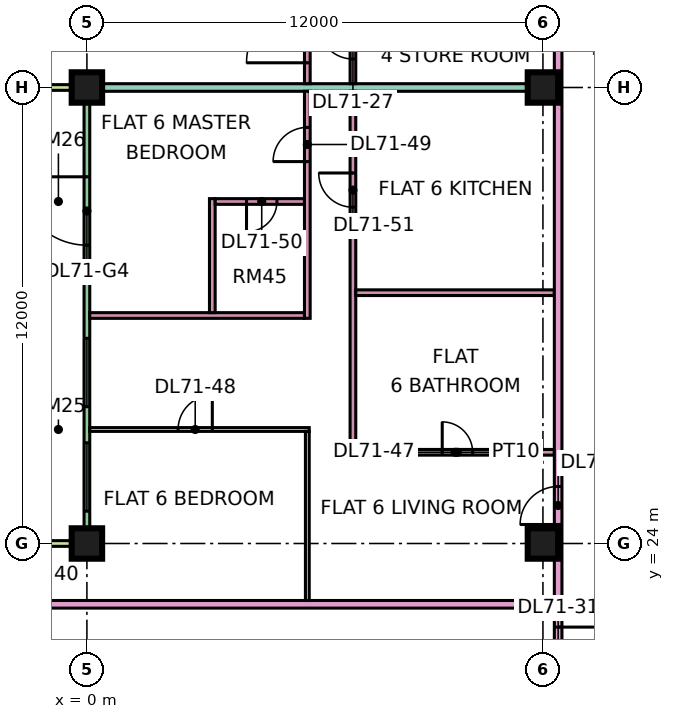
"""IFC4 building model, lengths in metres.
Left out: names, types, materials, properties, quantities, classifications, styles, units other than length and angle.
Written with IfcOpenShell. Run it as: python <this file> out.ifc"""

import sys

from ifc_helpers import new_model, si_unit, direction, frame, frame_2d, origin, origin_2d, place, context, subcontext, project, spatial, rectangle, extrude, element, fill, save


model = new_model("IFC4")
c1 = context("Model", 3, precision=1e-05, world=origin(), true_north=direction((0.0, 1.0)))
c2 = subcontext(c1, "Body", "Model", "MODEL_VIEW")
j1 = project(units=[si_unit("LENGTHUNIT", "METRE"), si_unit("PLANEANGLEUNIT", "RADIAN")], contexts=[c1])
p1 = place(None, origin())
s1 = spatial("IfcSite", under=j1, at=p1, CompositionType="ELEMENT")
p2 = place(p1, origin())
s2 = spatial("IfcBuilding", under=s1, at=p2, CompositionType="ELEMENT")
p3 = place(p2, frame((0.0, 0.0, 303.4)))
s3 = spatial("IfcBuildingStorey", under=s2, at=p3, CompositionType="ELEMENT", Elevation=303.4)
p4 = place(p3, frame((0.0, 24.0, 0.0), z_axis=(0.0, 0.0, 1.0), x_axis=(1.0, 0.0, 0.0)))
e1 = element("IfcColumn", 1, at=p4, inside=s3, PredefinedType="COLUMN", context=c2, shape_type="SweptSolid", body=[
    extrude(rectangle(XDim=0.8, YDim=0.8, at=origin_2d()), origin(), (0.0, 0.0, 1.0), 3.75),
])
p5 = place(p3, frame((0.0, 36.0, 0.0), z_axis=(0.0, 0.0, 1.0), x_axis=(1.0, 0.0, 0.0)))
e2 = element("IfcColumn", 2, at=p5, inside=s3, PredefinedType="COLUMN", context=c2, shape_type="SweptSolid", body=[
    extrude(rectangle(XDim=0.8, YDim=0.8, at=origin_2d()), origin(), (0.0, 0.0, 1.0), 3.75),
])
for number, where, z_axis, x_axis in (
    (3, (12.0, 24.0, 0.0), (0.0, 0.0, 1.0), (1.0, 0.0, 0.0)),
    (4, (12.0, 36.0, 0.0), (0.0, 0.0, 1.0), (1.0, 0.0, 0.0)),
):
    element("IfcColumn", number, at=place(p3, frame(where, z_axis=z_axis, x_axis=x_axis)), inside=s3, PredefinedType="COLUMN", context=c2, shape_type="SweptSolid", body=[
        extrude(rectangle(XDim=0.8, YDim=0.8, at=origin_2d()), origin(), (0.0, 0.0, 1.0), 3.75),
    ])
p6 = place(p3, frame((0.0, 35.925, 0.0), z_axis=(0.0, 0.0, 1.0), x_axis=(0.0, -1.0, 0.0)))
e5 = element("IfcWall", 5, at=p6, inside=s3, PredefinedType="SOLIDWALL", context=c2, shape_type="SweptSolid", body=[
    extrude(rectangle(XDim=11.85, YDim=0.15, at=frame_2d((5.925, 0.0))), origin(), (0.0, 0.0, 1.0), 3.35),
])
p7 = place(p6, frame((2.275, 0.0, 0.0)))
e6 = element("IfcOpeningElement", 6, at=p7, cuts=e5, PredefinedType="OPENING", context=c2, shape_type="SweptSolid", body=[
    extrude(rectangle(XDim=1.8, YDim=2.4, at=frame_2d((0.9, 1.2))), frame((0.0, 0.085, 0.0), z_axis=(0.0, -1.0, 0.0), x_axis=(1.0, 0.0, 0.0)), (0.0, 0.0, 1.0), 0.17),
])
p8 = place(p6, frame((6.525, 0.0, 0.45)))
e7 = element("IfcOpeningElement", 7, at=p8, cuts=e5, PredefinedType="OPENING", context=c2, shape_type="SweptSolid", body=[
    extrude(rectangle(XDim=1.8, YDim=2.4, at=frame_2d((0.9, 1.2))), frame((0.0, 0.085, 0.0), z_axis=(0.0, -1.0, 0.0), x_axis=(1.0, 0.0, 0.0)), (0.0, 0.0, 1.0), 0.17),
])
p9 = place(p6, frame((9.275, 0.0, 0.45)))
e8 = element("IfcOpeningElement", 8, at=p9, cuts=e5, PredefinedType="OPENING", context=c2, shape_type="SweptSolid", body=[
    extrude(rectangle(XDim=1.8, YDim=2.4, at=frame_2d((0.9, 1.2))), frame((0.0, 0.085, 0.0), z_axis=(0.0, -1.0, 0.0), x_axis=(1.0, 0.0, 0.0)), (0.0, 0.0, 1.0), 0.17),
])
for number, where, z_axis, x_axis in (
    (9, (-1.5, 36.0, 0.0), (0.0, 0.0, 1.0), (1.0, 0.0, 0.0)),
    (10, (-1.5, 24.0, 0.0), (0.0, 0.0, 1.0), (1.0, 0.0, 0.0)),
):
    element("IfcWall", number, at=place(p3, frame(where, z_axis=z_axis, x_axis=x_axis)), inside=s3, PredefinedType="SOLIDWALL", context=c2, shape_type="SweptSolid", body=[
        extrude(rectangle(XDim=1.5, YDim=0.15, at=frame_2d((0.75, 0.0))), origin(), (0.0, 0.0, 1.0), 3.35),
    ])
p10 = place(p3, frame((-1.35, 22.4, 0.0), z_axis=(0.0, 0.0, 1.0), x_axis=(1.0, 0.0, 0.0)))
e11 = element("IfcWall", 11, at=p10, inside=s3, PredefinedType="PARTITIONING", context=c2, shape_type="SweptSolid", body=[
    extrude(rectangle(XDim=13.65, YDim=0.2, at=frame_2d((6.825, 0.0))), origin(), (0.0, 0.0, 1.0), 3.35),
])
e12 = element("IfcWall", 12, at=p5, inside=s3, PredefinedType="PARTITIONING", context=c2, shape_type="SweptSolid", body=[
    extrude(rectangle(XDim=12.3, YDim=0.2, at=frame_2d((6.15, 0.0))), origin(), (0.0, 0.0, 1.0), 3.35),
])
p11 = place(p3, frame((0.074, 27.0, 0.0), z_axis=(0.0, 0.0, 1.0), x_axis=(1.0, 0.0, 0.0)))
e13 = element("IfcWall", 13, at=p11, inside=s3, PredefinedType="PARTITIONING", context=c2, shape_type="SweptSolid", body=[
    extrude(rectangle(XDim=5.776, YDim=0.1, at=frame_2d((2.888, 0.0))), origin(), (0.0, 0.0, 1.0), 3.35),
])
p12 = place(p11, frame((2.326, 0.0, 0.0)))
e14 = element("IfcOpeningElement", 14, at=p12, cuts=e13, PredefinedType="OPENING", context=c2, shape_type="SweptSolid", body=[
    extrude(rectangle(XDim=0.9, YDim=2.1, at=frame_2d((0.45, 1.05))), frame((0.0, 0.06, 0.0), z_axis=(0.0, -1.0, 0.0), x_axis=(1.0, 0.0, 0.0)), (0.0, 0.0, 1.0), 0.12),
])
p13 = place(p3, frame((0.074, 30.0, 0.0), z_axis=(0.0, 0.0, 1.0), x_axis=(1.0, 0.0, 0.0)))
e15 = element("IfcWall", 15, at=p13, inside=s3, PredefinedType="PARTITIONING", context=c2, shape_type="SweptSolid", body=[
    extrude(rectangle(XDim=5.651, YDim=0.15, at=frame_2d((2.826, 0.0))), origin(), (0.0, 0.0, 1.0), 3.35),
])
p14 = place(p3, frame((3.3, 30.075, 0.0), z_axis=(0.0, 0.0, 1.0), x_axis=(0.0, 1.0, 0.0)))
e16 = element("IfcWall", 16, at=p14, inside=s3, PredefinedType="PARTITIONING", context=c2, shape_type="SweptSolid", body=[
    extrude(rectangle(XDim=3.0, YDim=0.15, at=frame_2d((1.5, 0.0))), origin(), (0.0, 0.0, 1.0), 3.35),
])
p15 = place(p3, frame((3.375, 33.0, 0.0), z_axis=(0.0, 0.0, 1.0), x_axis=(1.0, 0.0, 0.0)))
e17 = element("IfcWall", 17, at=p15, inside=s3, PredefinedType="PARTITIONING", context=c2, shape_type="SweptSolid", body=[
    extrude(rectangle(XDim=2.35, YDim=0.15, at=frame_2d((1.175, 0.0))), origin(), (0.0, 0.0, 1.0), 3.35),
])
p16 = place(p15, frame((0.825, 0.0, 0.0)))
e18 = element("IfcOpeningElement", 18, at=p16, cuts=e17, PredefinedType="OPENING", context=c2, shape_type="SweptSolid", body=[
    extrude(rectangle(XDim=0.8, YDim=2.1, at=frame_2d((0.4, 1.05))), frame((0.0, 0.085, 0.0), z_axis=(0.0, -1.0, 0.0), x_axis=(1.0, 0.0, 0.0)), (0.0, 0.0, 1.0), 0.17),
])
p17 = place(p3, frame((5.8, 22.5, 0.0), z_axis=(0.0, 0.0, 1.0), x_axis=(0.0, 1.0, 0.0)))
e19 = element("IfcWall", 19, at=p17, inside=s3, PredefinedType="PARTITIONING", context=c2, shape_type="SweptSolid", body=[
    extrude(rectangle(XDim=4.45, YDim=0.1, at=frame_2d((2.225, 0.0))), origin(), (0.0, 0.0, 1.0), 3.35),
])
p18 = place(p3, frame((5.8, 29.925, 0.0), z_axis=(0.0, 0.0, 1.0), x_axis=(0.0, 1.0, 0.0)))
e20 = element("IfcWall", 20, at=p18, inside=s3, PredefinedType="PARTITIONING", context=c2, shape_type="SweptSolid", body=[
    extrude(rectangle(XDim=5.975, YDim=0.15, at=frame_2d((2.987, 0.0))), origin(), (0.0, 0.0, 1.0), 3.35),
])
p19 = place(p18, frame((4.125, 0.0, 0.0)))
e21 = element("IfcOpeningElement", 21, at=p19, cuts=e20, PredefinedType="OPENING", context=c2, shape_type="SweptSolid", body=[
    extrude(rectangle(XDim=0.9, YDim=2.1, at=frame_2d((0.45, 1.05))), frame((0.0, 0.085, 0.0), z_axis=(0.0, -1.0, 0.0), x_axis=(1.0, 0.0, 0.0)), (0.0, 0.0, 1.0), 0.17),
])
p20 = place(p3, frame((5.8, 36.1, 0.0), z_axis=(0.0, 0.0, 1.0), x_axis=(0.0, 1.0, 0.0)))
e22 = element("IfcWall", 22, at=p20, inside=s3, PredefinedType="PARTITIONING", context=c2, shape_type="SweptSolid", body=[
    extrude(rectangle(XDim=11.95, YDim=0.15, at=frame_2d((5.975, 0.0))), origin(), (0.0, 0.0, 1.0), 3.35),
])
p21 = place(p20, frame((9.95, 0.0, 0.0)))
e23 = element("IfcOpeningElement", 23, at=p21, cuts=e22, PredefinedType="OPENING", context=c2, shape_type="SweptSolid", body=[
    extrude(rectangle(XDim=0.9, YDim=2.1, at=frame_2d((0.45, 1.05))), frame((0.0, 0.085, 0.0), z_axis=(0.0, -1.0, 0.0), x_axis=(1.0, 0.0, 0.0)), (0.0, 0.0, 1.0), 0.17),
])
p22 = place(p20, frame((6.95, 0.0, 0.0)))
e24 = element("IfcOpeningElement", 24, at=p22, cuts=e22, PredefinedType="OPENING", context=c2, shape_type="SweptSolid", body=[
    extrude(rectangle(XDim=0.9, YDim=2.1, at=frame_2d((0.45, 1.05))), frame((0.0, 0.085, 0.0), z_axis=(0.0, -1.0, 0.0), x_axis=(1.0, 0.0, 0.0)), (0.0, 0.0, 1.0), 0.17),
])
p23 = place(p20, frame((0.55, 0.0, 0.0)))
e25 = element("IfcOpeningElement", 25, at=p23, cuts=e22, PredefinedType="OPENING", context=c2, shape_type="SweptSolid", body=[
    extrude(rectangle(XDim=1.6, YDim=2.1, at=frame_2d((0.8, 1.05))), frame((0.0, 0.085, 0.0), z_axis=(0.0, -1.0, 0.0), x_axis=(1.0, 0.0, 0.0)), (0.0, 0.0, 1.0), 0.17),
])
p24 = place(p3, frame((7.0, 26.325, 0.0), z_axis=(0.0, 0.0, 1.0), x_axis=(0.0, 1.0, 0.0)))
e26 = element("IfcWall", 26, at=p24, inside=s3, PredefinedType="PARTITIONING", context=c2, shape_type="SweptSolid", body=[
    extrude(rectangle(XDim=9.575, YDim=0.15, at=frame_2d((4.788, 0.0))), origin(), (0.0, 0.0, 1.0), 3.35),
])
p25 = place(p24, frame((6.525, 0.0, 0.0)))
e27 = element("IfcOpeningElement", 27, at=p25, cuts=e26, PredefinedType="OPENING", context=c2, shape_type="SweptSolid", body=[
    extrude(rectangle(XDim=0.9, YDim=2.1, at=frame_2d((0.45, 1.05))), frame((0.0, 0.085, 0.0), z_axis=(0.0, -1.0, 0.0), x_axis=(1.0, 0.0, 0.0)), (0.0, 0.0, 1.0), 0.17),
])
p26 = place(p3, frame((7.0, 36.1, 0.0), z_axis=(0.0, 0.0, 1.0), x_axis=(0.0, 1.0, 0.0)))
e28 = element("IfcWall", 28, at=p26, inside=s3, PredefinedType="PARTITIONING", context=c2, shape_type="SweptSolid", body=[
    extrude(rectangle(XDim=2.35, YDim=0.15, at=frame_2d((1.175, 0.0))), origin(), (0.0, 0.0, 1.0), 3.35),
])
p27 = place(p26, frame((0.65, 0.0, 0.0)))
e29 = element("IfcOpeningElement", 29, at=p27, cuts=e28, PredefinedType="OPENING", context=c2, shape_type="SweptSolid", body=[
    extrude(rectangle(XDim=0.9, YDim=2.1, at=frame_2d((0.45, 1.05))), frame((0.0, 0.085, 0.0), z_axis=(0.0, -1.0, 0.0), x_axis=(1.0, 0.0, 0.0)), (0.0, 0.0, 1.0), 0.17),
])
p28 = place(p3, frame((7.075, 26.4, 0.0), z_axis=(0.0, 0.0, 1.0), x_axis=(1.0, 0.0, 0.0)))
e30 = element("IfcWall", 30, at=p28, inside=s3, PredefinedType="PARTITIONING", context=c2, shape_type="SweptSolid", body=[
    extrude(rectangle(XDim=5.225, YDim=0.15, at=frame_2d((2.613, 0.0))), origin(), (0.0, 0.0, 1.0), 3.35),
])
p29 = place(p28, frame((2.275, 0.0, 0.0)))
e31 = element("IfcOpeningElement", 31, at=p29, cuts=e30, PredefinedType="OPENING", context=c2, shape_type="SweptSolid", body=[
    extrude(rectangle(XDim=0.8, YDim=2.1, at=frame_2d((0.4, 1.05))), frame((0.0, 0.085, 0.0), z_axis=(0.0, -1.0, 0.0), x_axis=(1.0, 0.0, 0.0)), (0.0, 0.0, 1.0), 0.17),
])
p30 = place(p3, frame((7.075, 30.6, 0.0), z_axis=(0.0, 0.0, 1.0), x_axis=(1.0, 0.0, 0.0)))
e32 = element("IfcWall", 32, at=p30, inside=s3, PredefinedType="PARTITIONING", context=c2, shape_type="SweptSolid", body=[
    extrude(rectangle(XDim=5.225, YDim=0.15, at=frame_2d((2.613, 0.0))), origin(), (0.0, 0.0, 1.0), 3.35),
])
p31 = place(p3, frame((12.4, 20.0, 0.0), z_axis=(0.0, 0.0, 1.0), x_axis=(0.0, 1.0, 0.0)))
e33 = element("IfcWall", 33, at=p31, inside=s3, PredefinedType="PARTITIONING", context=c2, shape_type="SweptSolid", body=[
    extrude(rectangle(XDim=34.0, YDim=0.2, at=frame_2d((17.0, 0.0))), origin(), (0.0, 0.0, 1.0), 3.35),
])
p32 = place(p31, frame((19.8, 0.0, 0.0)))
e34 = element("IfcOpeningElement", 34, at=p32, cuts=e33, PredefinedType="OPENING", context=c2, shape_type="SweptSolid", body=[
    extrude(rectangle(XDim=1.0, YDim=2.1, at=frame_2d((0.5, 1.05))), frame((0.0, 0.11, 0.0), z_axis=(0.0, -1.0, 0.0), x_axis=(1.0, 0.0, 0.0)), (0.0, 0.0, 1.0), 0.22),
])
p33 = place(p31, frame((0.6, 0.0, 0.0)))
e35 = element("IfcOpeningElement", 35, at=p33, cuts=e33, PredefinedType="OPENING", context=c2, shape_type="SweptSolid", body=[
    extrude(rectangle(XDim=1.2, YDim=2.1, at=frame_2d((0.6, 1.05))), frame((0.0, 0.11, 0.0), z_axis=(0.0, -1.0, 0.0), x_axis=(1.0, 0.0, 0.0)), (0.0, 0.0, 1.0), 0.22),
])
p34 = place(p31, frame((4.5, 0.0, 0.0)))
e36 = element("IfcOpeningElement", 36, at=p34, cuts=e33, PredefinedType="OPENING", context=c2, shape_type="SweptSolid", body=[
    extrude(rectangle(XDim=1.0, YDim=2.1, at=frame_2d((0.5, 1.05))), frame((0.0, 0.11, 0.0), z_axis=(0.0, -1.0, 0.0), x_axis=(1.0, 0.0, 0.0)), (0.0, 0.0, 1.0), 0.22),
])
p35 = place(p7, frame((1.8, 0.0, 0.0), z_axis=(0.0, 0.0, 1.0), x_axis=(-1.0, 0.0, 0.0)))
e37 = element("IfcDoor", 37, at=p35, inside=s3, OperationType="DOUBLE_DOOR_SINGLE_SWING", PredefinedType="DOOR", context=c2, shape_type="SweptSolid", body=[
    extrude(rectangle(XDim=1.8, YDim=2.4, at=frame_2d((0.9, 1.2))), frame((0.0, 0.025, 0.0), z_axis=(0.0, -1.0, 0.0), x_axis=(1.0, 0.0, 0.0)), (0.0, 0.0, 1.0), 0.05),
])
fill(e6, e37)
p36 = place(p8, origin())
e38 = element("IfcWindow", 38, at=p36, inside=s3, PartitioningType="SINGLE_PANEL", PredefinedType="WINDOW", context=c2, shape_type="SweptSolid", body=[
    extrude(rectangle(XDim=1.8, YDim=2.4, at=frame_2d((0.9, 1.2))), frame((0.0, 0.03, 0.0), z_axis=(0.0, -1.0, 0.0), x_axis=(1.0, 0.0, 0.0)), (0.0, 0.0, 1.0), 0.06),
])
fill(e7, e38)
p37 = place(p9, origin())
e39 = element("IfcWindow", 39, at=p37, inside=s3, PartitioningType="SINGLE_PANEL", PredefinedType="WINDOW", context=c2, shape_type="SweptSolid", body=[
    extrude(rectangle(XDim=1.8, YDim=2.4, at=frame_2d((0.9, 1.2))), frame((0.0, 0.03, 0.0), z_axis=(0.0, -1.0, 0.0), x_axis=(1.0, 0.0, 0.0)), (0.0, 0.0, 1.0), 0.06),
])
fill(e8, e39)
p38 = place(p23, origin())
e40 = element("IfcDoor", 40, at=p38, inside=s3, OperationType="DOUBLE_DOOR_SINGLE_SWING", PredefinedType="DOOR", context=c2, shape_type="SweptSolid", body=[
    extrude(rectangle(XDim=1.6, YDim=2.1, at=frame_2d((0.8, 1.05))), frame((0.0, 0.025, 0.0), z_axis=(0.0, -1.0, 0.0), x_axis=(1.0, 0.0, 0.0)), (0.0, 0.0, 1.0), 0.05),
])
fill(e25, e40)
p39 = place(p27, frame((0.9, 0.0, 0.0), z_axis=(0.0, 0.0, 1.0), x_axis=(-1.0, 0.0, 0.0)))
e41 = element("IfcDoor", 41, at=p39, inside=s3, OperationType="SINGLE_SWING_RIGHT", PredefinedType="DOOR", context=c2, shape_type="SweptSolid", body=[
    extrude(rectangle(XDim=0.9, YDim=2.1, at=frame_2d((0.45, 1.05))), frame((0.0, 0.025, 0.0), z_axis=(0.0, -1.0, 0.0), x_axis=(1.0, 0.0, 0.0)), (0.0, 0.0, 1.0), 0.05),
])
fill(e29, e41)
p40 = place(p33, origin())
e42 = element("IfcDoor", 42, at=p40, inside=s3, OperationType="SINGLE_SWING_RIGHT", PredefinedType="DOOR", context=c2, shape_type="SweptSolid", body=[
    extrude(rectangle(XDim=1.2, YDim=2.1, at=frame_2d((0.6, 1.05))), frame((0.0, 0.025, 0.0), z_axis=(0.0, -1.0, 0.0), x_axis=(1.0, 0.0, 0.0)), (0.0, 0.0, 1.0), 0.05),
])
fill(e35, e42)
p41 = place(p29, origin())
e43 = element("IfcDoor", 43, at=p41, inside=s3, OperationType="SINGLE_SWING_LEFT", PredefinedType="DOOR", context=c2, shape_type="SweptSolid", body=[
    extrude(rectangle(XDim=0.8, YDim=2.1, at=frame_2d((0.4, 1.05))), frame((0.0, 0.025, 0.0), z_axis=(0.0, -1.0, 0.0), x_axis=(1.0, 0.0, 0.0)), (0.0, 0.0, 1.0), 0.05),
])
fill(e31, e43)
p42 = place(p12, frame((0.9, 0.0, 0.0), z_axis=(0.0, 0.0, 1.0), x_axis=(-1.0, 0.0, 0.0)))
e44 = element("IfcDoor", 44, at=p42, inside=s3, OperationType="SINGLE_SWING_RIGHT", PredefinedType="DOOR", context=c2, shape_type="SweptSolid", body=[
    extrude(rectangle(XDim=0.9, YDim=2.1, at=frame_2d((0.45, 1.05))), frame((0.0, 0.025, 0.0), z_axis=(0.0, -1.0, 0.0), x_axis=(1.0, 0.0, 0.0)), (0.0, 0.0, 1.0), 0.05),
])
fill(e14, e44)
p43 = place(p19, origin())
e45 = element("IfcDoor", 45, at=p43, inside=s3, OperationType="SINGLE_SWING_LEFT", PredefinedType="DOOR", context=c2, shape_type="SweptSolid", body=[
    extrude(rectangle(XDim=0.9, YDim=2.1, at=frame_2d((0.45, 1.05))), frame((0.0, 0.025, 0.0), z_axis=(0.0, -1.0, 0.0), x_axis=(1.0, 0.0, 0.0)), (0.0, 0.0, 1.0), 0.05),
])
fill(e21, e45)
p44 = place(p16, frame((0.8, 0.0, 0.0), z_axis=(0.0, 0.0, 1.0), x_axis=(-1.0, 0.0, 0.0)))
e46 = element("IfcDoor", 46, at=p44, inside=s3, OperationType="SINGLE_SWING_LEFT", PredefinedType="DOOR", context=c2, shape_type="SweptSolid", body=[
    extrude(rectangle(XDim=0.8, YDim=2.1, at=frame_2d((0.4, 1.05))), frame((0.0, 0.025, 0.0), z_axis=(0.0, -1.0, 0.0), x_axis=(1.0, 0.0, 0.0)), (0.0, 0.0, 1.0), 0.05),
])
fill(e18, e46)
p45 = place(p25, frame((0.9, 0.0, 0.0), z_axis=(0.0, 0.0, 1.0), x_axis=(-1.0, 0.0, 0.0)))
e47 = element("IfcDoor", 47, at=p45, inside=s3, OperationType="SINGLE_SWING_RIGHT", PredefinedType="DOOR", context=c2, shape_type="SweptSolid", body=[
    extrude(rectangle(XDim=0.9, YDim=2.1, at=frame_2d((0.45, 1.05))), frame((0.0, 0.025, 0.0), z_axis=(0.0, -1.0, 0.0), x_axis=(1.0, 0.0, 0.0)), (0.0, 0.0, 1.0), 0.05),
])
fill(e27, e47)
p46 = place(p34, origin())
e48 = element("IfcDoor", 48, at=p46, inside=s3, OperationType="SINGLE_SWING_LEFT", PredefinedType="DOOR", context=c2, shape_type="SweptSolid", body=[
    extrude(rectangle(XDim=1.0, YDim=2.1, at=frame_2d((0.5, 1.05))), frame((0.0, 0.025, 0.0), z_axis=(0.0, -1.0, 0.0), x_axis=(1.0, 0.0, 0.0)), (0.0, 0.0, 1.0), 0.05),
])
fill(e36, e48)
save(model, sys.argv[1])
